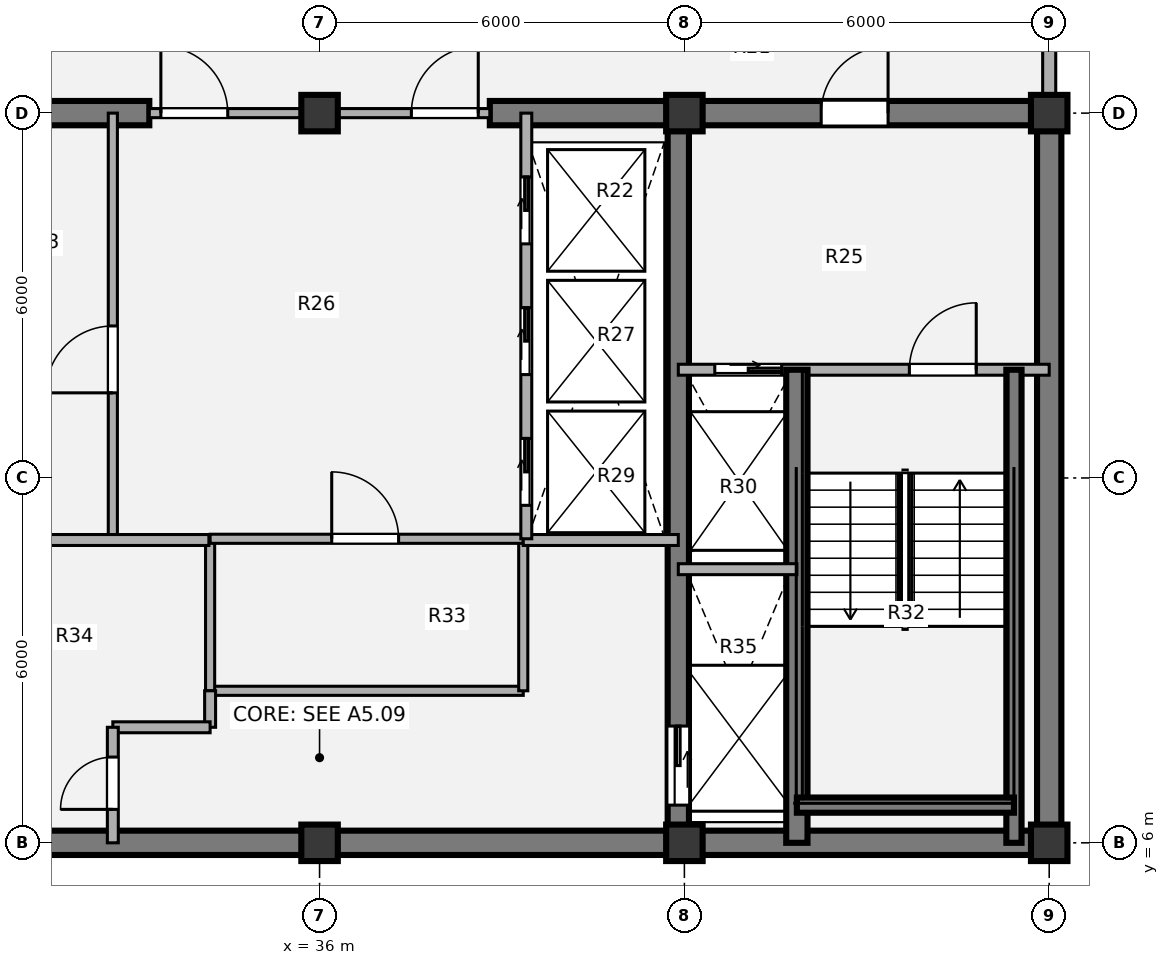
"""IFC4 building model, lengths in metres.
Left out: names, types, materials, properties, quantities, classifications, styles, units other than length and angle.
Written with IfcOpenShell. Run it as: python <this file> out.ifc"""

import sys

from ifc_helpers import new_model, si_unit, direction, frame, frame_2d, origin, origin_2d, place, context, subcontext, project, spatial, rectangle, extrude, source, transform, mapped, element, fill, save


model = new_model("IFC4")
c1 = context("Model", 3, precision=1e-05, world=origin(), true_north=direction((0.0, 1.0)))
c2 = subcontext(c1, "Body", "Model", "MODEL_VIEW")
j1 = project(units=[si_unit("LENGTHUNIT", "METRE"), si_unit("PLANEANGLEUNIT", "RADIAN")], contexts=[c1])
p1 = place(None, origin())
s1 = spatial("IfcSite", under=j1, at=p1, CompositionType="ELEMENT")
p2 = place(p1, origin())
s2 = spatial("IfcBuilding", under=s1, at=p2, CompositionType="ELEMENT")
p3 = place(p2, frame((0.0, 0.0, 272.16)))
s3 = spatial("IfcBuildingStorey", under=s2, at=p3, CompositionType="ELEMENT", Elevation=272.16)
m1 = source(origin(), c2, "Body", "SweptSolid", [
    extrude(rectangle(XDim=0.6, YDim=0.6, at=origin_2d()), origin(), (0.0, 0.0, 1.0), 3.78),
])
for number, where, z_axis, x_axis in (
    (1, (36.0, 6.0, 0.0), (0.0, 0.0, 1.0), (1.0, 0.0, 0.0)),
    (2, (42.0, 6.0, 0.0), (0.0, 0.0, 1.0), (1.0, 0.0, 0.0)),
    (3, (48.0, 6.0, 0.0), (0.0, 0.0, 1.0), (1.0, 0.0, 0.0)),
    (4, (36.0, 18.0, 0.0), (0.0, 0.0, 1.0), (1.0, 0.0, 0.0)),
    (5, (42.0, 18.0, 0.0), (0.0, 0.0, 1.0), (1.0, 0.0, 0.0)),
    (6, (48.0, 18.0, 0.0), (0.0, 0.0, 1.0), (1.0, 0.0, 0.0)),
):
    element("IfcColumn", number, at=place(p3, frame(where, z_axis=z_axis, x_axis=x_axis)), inside=s3, PredefinedType="COLUMN", context=c2, shape_type="MappedRepresentation", body=[
        mapped(m1, transform((0.0, 0.0, 0.0), x_axis=(1.0, 0.0, 0.0), y_axis=(0.0, 1.0, 0.0), z_axis=(0.0, 0.0, 1.0), scale=1.0)),
    ])
p4 = place(p3, frame((48.2, 6.0, 0.0), z_axis=(0.0, 0.0, 1.0), x_axis=(-1.0, 0.0, 0.0)))
e7 = element("IfcWall", 7, at=p4, inside=s3, PredefinedType="SHEAR", context=c2, shape_type="SweptSolid", body=[
    extrude(rectangle(XDim=24.4, YDim=0.4, at=frame_2d((12.2, 0.0))), origin(), (0.0, 0.0, 1.0), 3.78),
])
p5 = place(p3, frame((48.0, 18.0, 0.0), z_axis=(0.0, 0.0, 1.0), x_axis=(0.0, -1.0, 0.0)))
e8 = element("IfcWall", 8, at=p5, inside=s3, PredefinedType="SHEAR", context=c2, shape_type="SweptSolid", body=[
    extrude(rectangle(XDim=12.0, YDim=0.4, at=frame_2d((6.0, 0.0))), origin(), (0.0, 0.0, 1.0), 3.78),
])
p6 = place(p3, frame((23.8, 18.0, 0.0), z_axis=(0.0, 0.0, 1.0), x_axis=(1.0, 0.0, 0.0)))
e9 = element("IfcWall", 9, at=p6, inside=s3, PredefinedType="SHEAR", context=c2, shape_type="SweptSolid", body=[
    extrude(rectangle(XDim=9.4, YDim=0.4, at=frame_2d((4.7, 0.0))), origin(), (0.0, 0.0, 1.0), 3.78),
])
p7 = place(p6, frame((2.95, 0.0, 0.0)))
e10 = element("IfcOpeningElement", 10, at=p7, cuts=e9, PredefinedType="OPENING", context=c2, shape_type="SweptSolid", body=[
    extrude(rectangle(XDim=1.1, YDim=2.1, at=origin_2d()), frame((0.55, 0.21, 1.05), z_axis=(0.0, -1.0, 0.0), x_axis=(1.0, 0.0, 0.0)), (0.0, 0.0, 1.0), 0.42),
])
p8 = place(p3, frame((38.8, 18.0, 0.0), z_axis=(0.0, 0.0, 1.0), x_axis=(1.0, 0.0, 0.0)))
e11 = element("IfcWall", 11, at=p8, inside=s3, PredefinedType="SHEAR", context=c2, shape_type="SweptSolid", body=[
    extrude(rectangle(XDim=9.4, YDim=0.4, at=frame_2d((4.7, 0.0))), origin(), (0.0, 0.0, 1.0), 3.78),
])
p9 = place(p8, frame((5.45, 0.0, 0.0)))
e12 = element("IfcOpeningElement", 12, at=p9, cuts=e11, PredefinedType="OPENING", context=c2, shape_type="SweptSolid", body=[
    extrude(rectangle(XDim=1.1, YDim=2.1, at=origin_2d()), frame((0.55, 0.21, 1.05), z_axis=(0.0, -1.0, 0.0), x_axis=(1.0, 0.0, 0.0)), (0.0, 0.0, 1.0), 0.42),
])
p10 = place(p3, frame((41.9, 18.0, 0.0), z_axis=(0.0, 0.0, 1.0), x_axis=(0.0, -1.0, 0.0)))
e13 = element("IfcWall", 13, at=p10, inside=s3, PredefinedType="SHEAR", context=c2, shape_type="SweptSolid", body=[
    extrude(rectangle(XDim=12.0, YDim=0.35, at=frame_2d((6.0, 0.0))), origin(), (0.0, 0.0, 1.0), 3.78),
])
p11 = place(p10, frame((10.08, 0.0, 0.0)))
e14 = element("IfcOpeningElement", 14, at=p11, cuts=e13, PredefinedType="OPENING", context=c2, shape_type="SweptSolid", body=[
    extrude(rectangle(XDim=1.3, YDim=2.1, at=origin_2d()), frame((0.65, 0.185, 1.05), z_axis=(0.0, -1.0, 0.0), x_axis=(1.0, 0.0, 0.0)), (0.0, 0.0, 1.0), 0.37),
])
p12 = place(p3, frame((48.0, 21.05, 0.0), z_axis=(0.0, 0.0, 1.0), x_axis=(0.0, -1.0, 0.0)))
e15 = element("IfcWall", 15, at=p12, inside=s3, PredefinedType="SOLIDWALL", context=c2, shape_type="SweptSolid", body=[
    extrude(rectangle(XDim=2.77, YDim=0.215, at=frame_2d((1.385, 0.0))), origin(), (0.0, 0.0, 1.0), 2.718),
])
p13 = place(p3, frame((32.6, 11.0, 0.0), z_axis=(0.0, 0.0, 1.0), x_axis=(0.0, 1.0, 0.0)))
e16 = element("IfcWall", 16, at=p13, inside=s3, PredefinedType="PARTITIONING", context=c2, shape_type="SweptSolid", body=[
    extrude(rectangle(XDim=7.0, YDim=0.15, at=frame_2d((3.5, 0.0))), origin(), (0.0, 0.0, 1.0), 3.5),
])
p14 = place(p13, frame((2.4, 0.0, 0.0)))
e17 = element("IfcOpeningElement", 17, at=p14, cuts=e16, PredefinedType="OPENING", context=c2, shape_type="SweptSolid", body=[
    extrude(rectangle(XDim=1.1, YDim=2.1, at=origin_2d()), frame((0.55, 0.085, 1.05), z_axis=(0.0, -1.0, 0.0), x_axis=(1.0, 0.0, 0.0)), (0.0, 0.0, 1.0), 0.17),
])
p15 = place(p3, frame((34.2, 8.5, 0.0), z_axis=(0.0, 0.0, 1.0), x_axis=(1.0, 0.0, 0.0)))
e18 = element("IfcWall", 18, at=p15, inside=s3, PredefinedType="PARTITIONING", context=c2, shape_type="SweptSolid", body=[
    extrude(rectangle(XDim=5.15, YDim=0.15, at=frame_2d((2.575, 0.0))), origin(), (0.0, 0.0, 1.0), 3.5),
])
for number, where, z_axis, x_axis in (
    (19, (34.2, 8.5, 0.0), (0.0, 0.0, 1.0), (0.0, 1.0, 0.0)),
    (20, (39.35, 8.5, 0.0), (0.0, 0.0, 1.0), (0.0, 1.0, 0.0)),
):
    element("IfcWall", number, at=place(p3, frame(where, z_axis=z_axis, x_axis=x_axis)), inside=s3, PredefinedType="PARTITIONING", context=c2, shape_type="SweptSolid", body=[
        extrude(rectangle(XDim=2.5, YDim=0.15, at=frame_2d((1.25, 0.0))), origin(), (0.0, 0.0, 1.0), 3.5),
    ])
p16 = place(p3, frame((34.2, 11.0, 0.0), z_axis=(0.0, 0.0, 1.0), x_axis=(1.0, 0.0, 0.0)))
e21 = element("IfcWall", 21, at=p16, inside=s3, PredefinedType="PARTITIONING", context=c2, shape_type="SweptSolid", body=[
    extrude(rectangle(XDim=5.15, YDim=0.15, at=frame_2d((2.575, 0.0))), origin(), (0.0, 0.0, 1.0), 3.5),
])
p17 = place(p16, frame((2.0, 0.0, 0.0)))
e22 = element("IfcOpeningElement", 22, at=p17, cuts=e21, PredefinedType="OPENING", context=c2, shape_type="SweptSolid", body=[
    extrude(rectangle(XDim=1.1, YDim=2.1, at=origin_2d()), frame((0.55, 0.085, 1.05), z_axis=(0.0, -1.0, 0.0), x_axis=(1.0, 0.0, 0.0)), (0.0, 0.0, 1.0), 0.17),
])
p18 = place(p3, frame((30.1, 10.98, 0.0), z_axis=(0.0, 0.0, 1.0), x_axis=(1.0, 0.0, 0.0)))
e23 = element("IfcWall", 23, at=p18, inside=s3, PredefinedType="PARTITIONING", context=c2, shape_type="SweptSolid", body=[
    extrude(rectangle(XDim=4.08, YDim=0.18, at=frame_2d((2.04, 0.0))), origin(), (0.0, 0.0, 1.0), 3.5),
])
p19 = place(p3, frame((34.2, 7.9, 0.0), z_axis=(0.0, 0.0, 1.0), x_axis=(0.0, 1.0, 0.0)))
e24 = element("IfcWall", 24, at=p19, inside=s3, PredefinedType="PARTITIONING", context=c2, shape_type="SweptSolid", body=[
    extrude(rectangle(XDim=0.6, YDim=0.18, at=frame_2d((0.3, 0.0))), origin(), (0.0, 0.0, 1.0), 3.5),
])
p20 = place(p3, frame((32.6, 7.9, 0.0), z_axis=(0.0, 0.0, 1.0), x_axis=(1.0, 0.0, 0.0)))
e25 = element("IfcWall", 25, at=p20, inside=s3, PredefinedType="PARTITIONING", context=c2, shape_type="SweptSolid", body=[
    extrude(rectangle(XDim=1.6, YDim=0.18, at=frame_2d((0.8, 0.0))), origin(), (0.0, 0.0, 1.0), 3.5),
])
p21 = place(p3, frame((32.6, 6.0, 0.0), z_axis=(0.0, 0.0, 1.0), x_axis=(0.0, 1.0, 0.0)))
e26 = element("IfcWall", 26, at=p21, inside=s3, PredefinedType="PARTITIONING", context=c2, shape_type="SweptSolid", body=[
    extrude(rectangle(XDim=1.9, YDim=0.18, at=frame_2d((0.95, 0.0))), origin(), (0.0, 0.0, 1.0), 3.5),
])
p22 = place(p21, frame((0.55, 0.0, 0.0)))
e27 = element("IfcOpeningElement", 27, at=p22, cuts=e26, PredefinedType="OPENING", context=c2, shape_type="SweptSolid", body=[
    extrude(rectangle(XDim=0.86, YDim=2.1, at=origin_2d()), frame((0.43, 0.1, 1.05), z_axis=(0.0, -1.0, 0.0), x_axis=(1.0, 0.0, 0.0)), (0.0, 0.0, 1.0), 0.2),
])
p23 = place(p3, frame((39.35, 10.98, 0.0), z_axis=(0.0, 0.0, 1.0), x_axis=(1.0, 0.0, 0.0)))
e28 = element("IfcWall", 28, at=p23, inside=s3, PredefinedType="PARTITIONING", context=c2, shape_type="SweptSolid", body=[
    extrude(rectangle(XDim=2.55, YDim=0.18, at=frame_2d((1.275, 0.0))), origin(), (0.0, 0.0, 1.0), 3.5),
])
p24 = place(p3, frame((33.2, 18.0, 0.0), z_axis=(0.0, 0.0, 1.0), x_axis=(1.0, 0.0, 0.0)))
e29 = element("IfcWall", 29, at=p24, inside=s3, PredefinedType="PARTITIONING", context=c2, shape_type="SweptSolid", body=[
    extrude(rectangle(XDim=5.6, YDim=0.15, at=frame_2d((2.8, 0.0))), origin(), (0.0, 0.0, 1.0), 2.515),
])
p25 = place(p24, frame((0.19, 0.0, 0.0)))
e30 = element("IfcOpeningElement", 30, at=p25, cuts=e29, PredefinedType="OPENING", context=c2, shape_type="SweptSolid", body=[
    extrude(rectangle(XDim=1.1, YDim=2.1, at=origin_2d()), frame((0.55, 0.085, 1.05), z_axis=(0.0, -1.0, 0.0), x_axis=(1.0, 0.0, 0.0)), (0.0, 0.0, 1.0), 0.17),
])
p26 = place(p24, frame((4.31, 0.0, 0.0)))
e31 = element("IfcOpeningElement", 31, at=p26, cuts=e29, PredefinedType="OPENING", context=c2, shape_type="SweptSolid", body=[
    extrude(rectangle(XDim=1.1, YDim=2.1, at=origin_2d()), frame((0.55, 0.085, 1.05), z_axis=(0.0, -1.0, 0.0), x_axis=(1.0, 0.0, 0.0)), (0.0, 0.0, 1.0), 0.17),
])
p27 = place(p3, frame((41.9, 13.78, 0.0), z_axis=(0.0, 0.0, 1.0), x_axis=(1.0, 0.0, 0.0)))
e32 = element("IfcWall", 32, at=p27, inside=s3, PredefinedType="PARTITIONING", context=c2, shape_type="SweptSolid", body=[
    extrude(rectangle(XDim=6.1, YDim=0.18, at=frame_2d((3.05, 0.0))), origin(), (0.0, 0.0, 1.0), 3.5),
])
p28 = place(p27, frame((0.6, 0.0, 0.0)))
e33 = element("IfcOpeningElement", 33, at=p28, cuts=e32, PredefinedType="OPENING", context=c2, shape_type="SweptSolid", body=[
    extrude(rectangle(XDim=1.1, YDim=2.1, at=origin_2d()), frame((0.55, 0.1, 1.05), z_axis=(0.0, -1.0, 0.0), x_axis=(1.0, 0.0, 0.0)), (0.0, 0.0, 1.0), 0.2),
])
p29 = place(p27, frame((3.8, 0.0, 0.0)))
e34 = element("IfcOpeningElement", 34, at=p29, cuts=e32, PredefinedType="OPENING", context=c2, shape_type="SweptSolid", body=[
    extrude(rectangle(XDim=1.1, YDim=2.1, at=origin_2d()), frame((0.55, 0.1, 1.05), z_axis=(0.0, -1.0, 0.0), x_axis=(1.0, 0.0, 0.0)), (0.0, 0.0, 1.0), 0.2),
])
p30 = place(p3, frame((43.85, 6.0, 0.0), z_axis=(0.0, 0.0, 1.0), x_axis=(0.0, 1.0, 0.0)))
e35 = element("IfcWall", 35, at=p30, inside=s3, PredefinedType="SHEAR", context=c2, shape_type="SweptSolid", body=[
    extrude(rectangle(XDim=7.78, YDim=0.35, at=frame_2d((3.89, 0.0))), origin(), (0.0, 0.0, 1.0), 3.85),
])
p31 = place(p3, frame((47.42, 6.0, 0.0), z_axis=(0.0, 0.0, 1.0), x_axis=(0.0, 1.0, 0.0)))
e36 = element("IfcWall", 36, at=p31, inside=s3, PredefinedType="SHEAR", context=c2, shape_type="SweptSolid", body=[
    extrude(rectangle(XDim=7.78, YDim=0.25, at=frame_2d((3.89, 0.0))), origin(), (0.0, 0.0, 1.0), 3.85),
])
p32 = place(p3, frame((43.85, 6.62, 0.0), z_axis=(0.0, 0.0, 1.0), x_axis=(1.0, 0.0, 0.0)))
e37 = element("IfcWall", 37, at=p32, inside=s3, PredefinedType="SHEAR", context=c2, shape_type="SweptSolid", body=[
    extrude(rectangle(XDim=3.57, YDim=0.25, at=frame_2d((1.785, 0.0))), origin(), (0.0, 0.0, 1.0), 3.85),
])
p33 = place(p3, frame((41.9, 10.5, 0.0), z_axis=(0.0, 0.0, 1.0), x_axis=(1.0, 0.0, 0.0)))
e38 = element("IfcWall", 38, at=p33, inside=s3, PredefinedType="PARTITIONING", context=c2, shape_type="SweptSolid", body=[
    extrude(rectangle(XDim=1.95, YDim=0.18, at=frame_2d((0.975, 0.0))), origin(), (0.0, 0.0, 1.0), 3.5),
])
p34 = place(p3, frame((39.4, 11.0, 0.0), z_axis=(0.0, 0.0, 1.0), x_axis=(0.0, 1.0, 0.0)))
e39 = element("IfcWall", 39, at=p34, inside=s3, PredefinedType="PARTITIONING", context=c2, shape_type="SweptSolid", body=[
    extrude(rectangle(XDim=7.0, YDim=0.18, at=frame_2d((3.5, 0.0))), origin(), (0.0, 0.0, 1.0), 3.5),
])
p35 = place(p34, frame((0.55, 0.0, 0.0)))
e40 = element("IfcOpeningElement", 40, at=p35, cuts=e39, PredefinedType="OPENING", context=c2, shape_type="SweptSolid", body=[
    extrude(rectangle(XDim=1.1, YDim=2.1, at=origin_2d()), frame((0.55, 0.1, 1.05), z_axis=(0.0, -1.0, 0.0), x_axis=(1.0, 0.0, 0.0)), (0.0, 0.0, 1.0), 0.2),
])
p36 = place(p34, frame((2.7, 0.0, 0.0)))
e41 = element("IfcOpeningElement", 41, at=p36, cuts=e39, PredefinedType="OPENING", context=c2, shape_type="SweptSolid", body=[
    extrude(rectangle(XDim=1.1, YDim=2.1, at=origin_2d()), frame((0.55, 0.1, 1.05), z_axis=(0.0, -1.0, 0.0), x_axis=(1.0, 0.0, 0.0)), (0.0, 0.0, 1.0), 0.2),
])
p37 = place(p34, frame((4.85, 0.0, 0.0)))
e42 = element("IfcOpeningElement", 42, at=p37, cuts=e39, PredefinedType="OPENING", context=c2, shape_type="SweptSolid", body=[
    extrude(rectangle(XDim=1.1, YDim=2.1, at=origin_2d()), frame((0.55, 0.1, 1.05), z_axis=(0.0, -1.0, 0.0), x_axis=(1.0, 0.0, 0.0)), (0.0, 0.0, 1.0), 0.2),
])
m2 = source(origin(), c2, "Body", "SweptSolid", [
    extrude(rectangle(XDim=1.1, YDim=2.1, at=origin_2d()), frame((0.55, 0.025, 1.05), z_axis=(0.0, -1.0, 0.0), x_axis=(1.0, 0.0, 0.0)), (0.0, 0.0, 1.0), 0.05),
])
p38 = place(p14, origin())
e43 = element("IfcDoor", 43, at=p38, inside=s3, OperationType="SINGLE_SWING_LEFT", PredefinedType="DOOR", context=c2, shape_type="MappedRepresentation", body=[
    mapped(m2, transform((0.0, 0.0, 0.0), x_axis=(1.0, 0.0, 0.0), y_axis=(0.0, 1.0, 0.0), z_axis=(0.0, 0.0, 1.0), scale=1.0)),
])
fill(e17, e43)
p39 = place(p17, origin())
e44 = element("IfcDoor", 44, at=p39, inside=s3, OperationType="SINGLE_SWING_LEFT", PredefinedType="DOOR", context=c2, shape_type="MappedRepresentation", body=[
    mapped(m2, transform((0.0, 0.0, 0.0), x_axis=(1.0, 0.0, 0.0), y_axis=(0.0, 1.0, 0.0), z_axis=(0.0, 0.0, 1.0), scale=1.0)),
])
fill(e22, e44)
m3 = source(origin(), c2, "Body", "SweptSolid", [
    extrude(rectangle(XDim=0.86, YDim=2.1, at=origin_2d()), frame((0.43, 0.025, 1.05), z_axis=(0.0, -1.0, 0.0), x_axis=(1.0, 0.0, 0.0)), (0.0, 0.0, 1.0), 0.05),
])
p40 = place(p22, origin())
e45 = element("IfcDoor", 45, at=p40, inside=s3, OperationType="SINGLE_SWING_LEFT", PredefinedType="DOOR", context=c2, shape_type="MappedRepresentation", body=[
    mapped(m3, transform((0.0, 0.0, 0.0), x_axis=(1.0, 0.0, 0.0), y_axis=(0.0, 1.0, 0.0), z_axis=(0.0, 0.0, 1.0), scale=1.0)),
])
fill(e27, e45)
m4 = source(origin(), c2, "Body", "SweptSolid", [
    extrude(rectangle(XDim=1.1, YDim=2.1, at=origin_2d()), frame((0.55, 0.025, 1.05), z_axis=(0.0, -1.0, 0.0), x_axis=(1.0, 0.0, 0.0)), (0.0, 0.0, 1.0), 0.05),
])
p41 = place(p25, origin())
e46 = element("IfcDoor", 46, at=p41, inside=s3, OperationType="SINGLE_SWING_LEFT", PredefinedType="DOOR", context=c2, shape_type="MappedRepresentation", body=[
    mapped(m4, transform((0.0, 0.0, 0.0), x_axis=(1.0, 0.0, 0.0), y_axis=(0.0, 1.0, 0.0), z_axis=(0.0, 0.0, 1.0), scale=1.0)),
])
fill(e30, e46)
p42 = place(p26, origin())
e47 = element("IfcDoor", 47, at=p42, inside=s3, OperationType="SINGLE_SWING_RIGHT", PredefinedType="DOOR", context=c2, shape_type="MappedRepresentation", body=[
    mapped(m4, transform((0.0, 0.0, 0.0), x_axis=(1.0, 0.0, 0.0), y_axis=(0.0, 1.0, 0.0), z_axis=(0.0, 0.0, 1.0), scale=1.0)),
])
fill(e31, e47)
m5 = source(origin(), c2, "Body", "SweptSolid", [
    extrude(rectangle(XDim=1.1, YDim=2.1, at=origin_2d()), frame((0.55, 0.025, 1.05), z_axis=(0.0, -1.0, 0.0), x_axis=(1.0, 0.0, 0.0)), (0.0, 0.0, 1.0), 0.05),
])
p43 = place(p28, origin())
e48 = element("IfcDoor", 48, at=p43, inside=s3, OperationType="SLIDING_TO_RIGHT", PredefinedType="DOOR", context=c2, shape_type="MappedRepresentation", body=[
    mapped(m5, transform((0.0, 0.0, 0.0), x_axis=(1.0, 0.0, 0.0), y_axis=(0.0, 1.0, 0.0), z_axis=(0.0, 0.0, 1.0), scale=1.0)),
])
fill(e33, e48)
m6 = source(origin(), c2, "Body", "SweptSolid", [
    extrude(rectangle(XDim=1.1, YDim=2.1, at=origin_2d()), frame((0.55, 0.025, 1.05), z_axis=(0.0, -1.0, 0.0), x_axis=(1.0, 0.0, 0.0)), (0.0, 0.0, 1.0), 0.05),
])
p44 = place(p29, origin())
e49 = element("IfcDoor", 49, at=p44, inside=s3, OperationType="SINGLE_SWING_RIGHT", PredefinedType="DOOR", context=c2, shape_type="MappedRepresentation", body=[
    mapped(m6, transform((0.0, 0.0, 0.0), x_axis=(1.0, 0.0, 0.0), y_axis=(0.0, 1.0, 0.0), z_axis=(0.0, 0.0, 1.0), scale=1.0)),
])
fill(e34, e49)
m7 = source(origin(), c2, "Body", "SweptSolid", [
    extrude(rectangle(XDim=1.3, YDim=2.1, at=origin_2d()), frame((0.65, 0.025, 1.05), z_axis=(0.0, -1.0, 0.0), x_axis=(1.0, 0.0, 0.0)), (0.0, 0.0, 1.0), 0.05),
])
p45 = place(p11, origin())
e50 = element("IfcDoor", 50, at=p45, inside=s3, OperationType="SLIDING_TO_LEFT", PredefinedType="DOOR", context=c2, shape_type="MappedRepresentation", body=[
    mapped(m7, transform((0.0, 0.0, 0.0), x_axis=(1.0, 0.0, 0.0), y_axis=(0.0, 1.0, 0.0), z_axis=(0.0, 0.0, 1.0), scale=1.0)),
])
fill(e14, e50)
p46 = place(p9, origin())
e51 = element("IfcDoor", 51, at=p46, inside=s3, OperationType="SINGLE_SWING_RIGHT", PredefinedType="DOOR", context=c2, shape_type="MappedRepresentation", body=[
    mapped(m4, transform((0.0, 0.0, 0.0), x_axis=(1.0, 0.0, 0.0), y_axis=(0.0, 1.0, 0.0), z_axis=(0.0, 0.0, 1.0), scale=1.0)),
])
fill(e12, e51)
p47 = place(p35, origin())
e52 = element("IfcDoor", 52, at=p47, inside=s3, OperationType="SLIDING_TO_RIGHT", PredefinedType="DOOR", context=c2, shape_type="MappedRepresentation", body=[
    mapped(m5, transform((0.0, 0.0, 0.0), x_axis=(1.0, 0.0, 0.0), y_axis=(0.0, 1.0, 0.0), z_axis=(0.0, 0.0, 1.0), scale=1.0)),
])
fill(e40, e52)
p48 = place(p36, origin())
e53 = element("IfcDoor", 53, at=p48, inside=s3, OperationType="SLIDING_TO_RIGHT", PredefinedType="DOOR", context=c2, shape_type="MappedRepresentation", body=[
    mapped(m5, transform((0.0, 0.0, 0.0), x_axis=(1.0, 0.0, 0.0), y_axis=(0.0, 1.0, 0.0), z_axis=(0.0, 0.0, 1.0), scale=1.0)),
])
fill(e41, e53)
p49 = place(p37, origin())
e54 = element("IfcDoor", 54, at=p49, inside=s3, OperationType="SLIDING_TO_RIGHT", PredefinedType="DOOR", context=c2, shape_type="MappedRepresentation", body=[
    mapped(m5, transform((0.0, 0.0, 0.0), x_axis=(1.0, 0.0, 0.0), y_axis=(0.0, 1.0, 0.0), z_axis=(0.0, 0.0, 1.0), scale=1.0)),
])
fill(e42, e54)
save(model, sys.argv[1])
